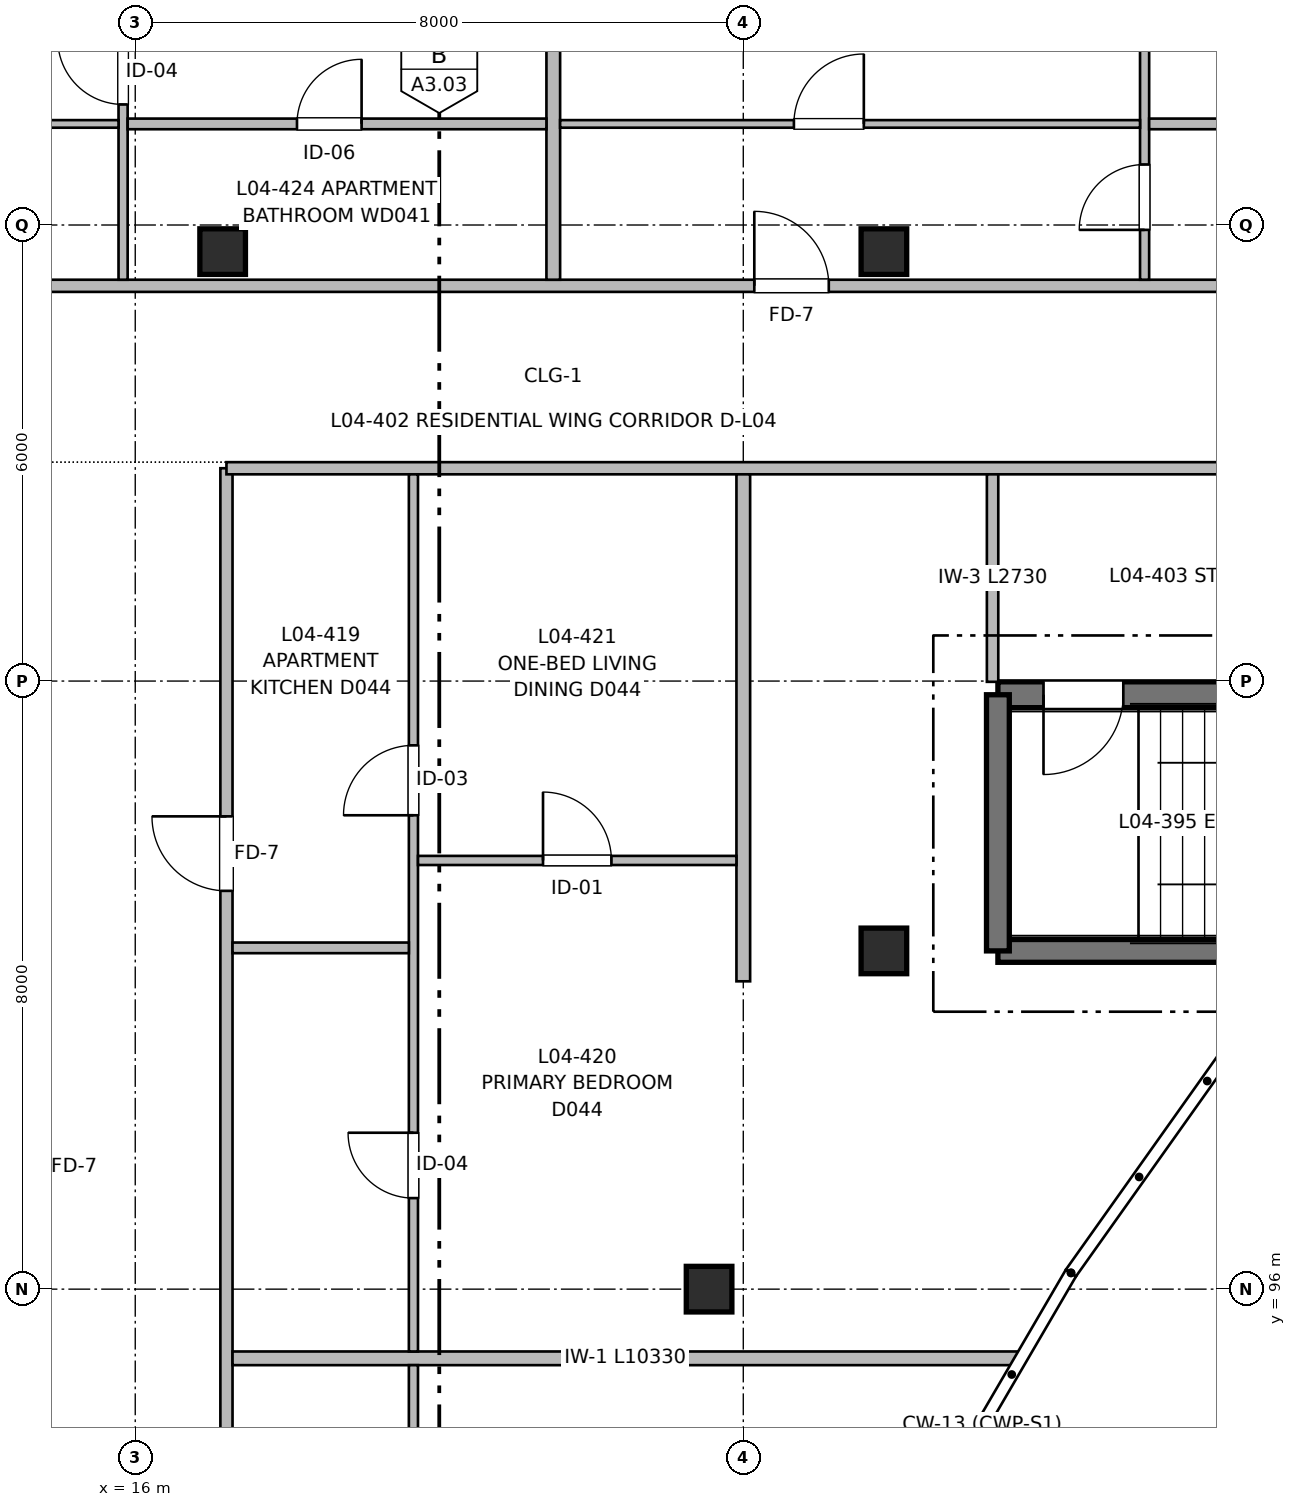
"""IFC4 building model, lengths in metres.
Left out: names, types, materials, properties, quantities, classifications, styles, units other than length and angle.
Written with IfcOpenShell. Run it as: python <this file> out.ifc"""

import sys

from ifc_helpers import new_model, si_unit, direction, frame, frame_2d, origin, origin_2d, place, context, subcontext, project, spatial, rectangle, extrude, element, fill, save


model = new_model("IFC4")
c1 = context("Model", 3, precision=1e-05, world=origin(), true_north=direction((0.0, 1.0)))
c2 = subcontext(c1, "Body", "Model", "MODEL_VIEW")
j1 = project(units=[si_unit("LENGTHUNIT", "METRE"), si_unit("PLANEANGLEUNIT", "RADIAN")], contexts=[c1])
p1 = place(None, origin())
s1 = spatial("IfcSite", under=j1, at=p1, CompositionType="ELEMENT")
p2 = place(p1, origin())
s2 = spatial("IfcBuilding", under=s1, at=p2, CompositionType="ELEMENT")
p3 = place(p2, frame((0.0, 0.0, 13.76)))
s3 = spatial("IfcBuildingStorey", under=s2, at=p3, CompositionType="ELEMENT", Elevation=13.76)
for number, where, z_axis, x_axis in (
    (1, (17.15, 109.65, 0.0), (0.0, 0.0, 1.0), (1.0, 0.0, 0.0)),
    (2, (23.55, 96.0, 0.0), (0.0, 0.0, 1.0), (1.0, 0.0, 0.0)),
    (3, (25.85, 100.45, 0.0), (0.0, 0.0, 1.0), (1.0, 0.0, 0.0)),
    (4, (25.85, 109.65, 0.0), (0.0, 0.0, 1.0), (1.0, 0.0, 0.0)),
):
    element("IfcColumn", number, at=place(p3, frame(where, z_axis=z_axis, x_axis=x_axis)), inside=s3, PredefinedType="COLUMN", context=c2, shape_type="SweptSolid", body=[
        extrude(rectangle(XDim=0.6, YDim=0.6, at=origin_2d()), origin(), (0.0, 0.0, 1.0), 3.2),
    ])
p4 = place(p3, frame((27.35, 100.45, 0.0), z_axis=(0.0, 0.0, 1.0), x_axis=(1.0, 0.0, 0.0)))
e5 = element("IfcWall", 5, at=p4, inside=s3, PredefinedType="SHEAR", context=c2, shape_type="SweptSolid", body=[
    extrude(rectangle(XDim=6.9, YDim=0.3, at=frame_2d((3.45, 0.0))), origin(), (0.0, 0.0, 1.0), 3.2),
])
p5 = place(p3, frame((34.25, 103.82, 0.0), z_axis=(0.0, 0.0, 1.0), x_axis=(-1.0, 0.0, 0.0)))
e6 = element("IfcWall", 6, at=p5, inside=s3, PredefinedType="SHEAR", context=c2, shape_type="SweptSolid", body=[
    extrude(rectangle(XDim=6.9, YDim=0.34, at=frame_2d((3.45, 0.0))), origin(), (0.0, 0.0, 1.0), 3.2),
])
p6 = place(p5, frame((5.25, 0.0, 0.0)))
e7 = element("IfcOpeningElement", 7, at=p6, cuts=e6, PredefinedType="OPENING", context=c2, shape_type="SweptSolid", body=[
    extrude(rectangle(XDim=1.05, YDim=2.15, at=frame_2d((0.525, 1.075))), frame((0.0, 0.18, 0.0), z_axis=(0.0, -1.0, 0.0), x_axis=(1.0, 0.0, 0.0)), (0.0, 0.0, 1.0), 0.36),
])
p7 = place(p3, frame((27.35, 103.82, 0.0), z_axis=(0.0, 0.0, 1.0), x_axis=(0.0, -1.0, 0.0)))
e8 = element("IfcWall", 8, at=p7, inside=s3, PredefinedType="SHEAR", context=c2, shape_type="SweptSolid", body=[
    extrude(rectangle(XDim=3.37, YDim=0.3, at=frame_2d((1.685, 0.0))), origin(), (0.0, 0.0, 1.0), 3.2),
])
p8 = place(p3, frame((17.2, 56.16, 0.0), z_axis=(0.0, 0.0, 1.0), x_axis=(0.0, 1.0, 0.0)))
e9 = element("IfcWall", 9, at=p8, inside=s3, PredefinedType="PARTITIONING", context=c2, shape_type="SweptSolid", body=[
    extrude(rectangle(XDim=50.64, YDim=0.16, at=frame_2d((25.32, 0.0))), origin(), (0.0, 0.0, 1.0), 2.935),
])
p9 = place(p8, frame((6.99, 0.0, 0.0)))
e10 = element("IfcOpeningElement", 10, at=p9, cuts=e9, PredefinedType="OPENING", context=c2, shape_type="SweptSolid", body=[
    extrude(rectangle(XDim=0.98, YDim=2.15, at=frame_2d((0.49, 1.075))), frame((0.0, 0.09, 0.0), z_axis=(0.0, -1.0, 0.0), x_axis=(1.0, 0.0, 0.0)), (0.0, 0.0, 1.0), 0.18),
])
p10 = place(p8, frame((20.92, 0.0, 0.0)))
e11 = element("IfcOpeningElement", 11, at=p10, cuts=e9, PredefinedType="OPENING", context=c2, shape_type="SweptSolid", body=[
    extrude(rectangle(XDim=0.98, YDim=2.15, at=frame_2d((0.49, 1.075))), frame((0.0, 0.09, 0.0), z_axis=(0.0, -1.0, 0.0), x_axis=(1.0, 0.0, 0.0)), (0.0, 0.0, 1.0), 0.18),
])
p11 = place(p8, frame((33.68, 0.0, 0.0)))
e12 = element("IfcOpeningElement", 12, at=p11, cuts=e9, PredefinedType="OPENING", context=c2, shape_type="SweptSolid", body=[
    extrude(rectangle(XDim=0.98, YDim=2.15, at=frame_2d((0.49, 1.075))), frame((0.0, 0.09, 0.0), z_axis=(0.0, -1.0, 0.0), x_axis=(1.0, 0.0, 0.0)), (0.0, 0.0, 1.0), 0.18),
])
p12 = place(p8, frame((45.08, 0.0, 0.0)))
e13 = element("IfcOpeningElement", 13, at=p12, cuts=e9, PredefinedType="OPENING", context=c2, shape_type="SweptSolid", body=[
    extrude(rectangle(XDim=0.98, YDim=2.15, at=frame_2d((0.49, 1.075))), frame((0.0, 0.09, 0.0), z_axis=(0.0, -1.0, 0.0), x_axis=(1.0, 0.0, 0.0)), (0.0, 0.0, 1.0), 0.18),
])
p13 = place(p3, frame((17.2, 106.8, 0.0), z_axis=(0.0, 0.0, 1.0), x_axis=(1.0, 0.0, 0.0)))
e14 = element("IfcWall", 14, at=p13, inside=s3, PredefinedType="PARTITIONING", context=c2, shape_type="SweptSolid", body=[
    extrude(rectangle(XDim=17.64, YDim=0.16, at=frame_2d((8.82, 0.0))), origin(), (0.0, 0.0, 1.0), 2.935),
])
p14 = place(p13, frame((13.075, 0.0, 0.0)))
e15 = element("IfcOpeningElement", 15, at=p14, cuts=e14, PredefinedType="OPENING", context=c2, shape_type="SweptSolid", body=[
    extrude(rectangle(XDim=1.05, YDim=2.15, at=frame_2d((0.525, 1.075))), frame((0.0, 0.09, 0.0), z_axis=(0.0, -1.0, 0.0), x_axis=(1.0, 0.0, 0.0)), (0.0, 0.0, 1.0), 0.18),
])
p15 = place(p3, frame((8.16, 109.2, 0.0), z_axis=(0.0, 0.0, 1.0), x_axis=(1.0, 0.0, 0.0)))
e16 = element("IfcWall", 16, at=p15, inside=s3, PredefinedType="PARTITIONING", context=c2, shape_type="SweptSolid", body=[
    extrude(rectangle(XDim=26.68, YDim=0.16, at=frame_2d((13.34, 0.0))), origin(), (0.0, 0.0, 1.0), 2.935),
])
p16 = place(p15, frame((3.35, 0.0, 0.0)))
e17 = element("IfcOpeningElement", 17, at=p16, cuts=e16, PredefinedType="OPENING", context=c2, shape_type="SweptSolid", body=[
    extrude(rectangle(XDim=0.98, YDim=2.15, at=frame_2d((0.49, 1.075))), frame((0.0, 0.09, 0.0), z_axis=(0.0, -1.0, 0.0), x_axis=(1.0, 0.0, 0.0)), (0.0, 0.0, 1.0), 0.18),
])
p17 = place(p15, frame((15.985, 0.0, 0.0)))
e18 = element("IfcOpeningElement", 18, at=p17, cuts=e16, PredefinedType="OPENING", context=c2, shape_type="SweptSolid", body=[
    extrude(rectangle(XDim=0.98, YDim=2.15, at=frame_2d((0.49, 1.075))), frame((0.0, 0.09, 0.0), z_axis=(0.0, -1.0, 0.0), x_axis=(1.0, 0.0, 0.0)), (0.0, 0.0, 1.0), 0.18),
])
p18 = place(p3, frame((24.0, 100.05, 0.0), z_axis=(0.0, 0.0, 1.0), x_axis=(0.0, 1.0, 0.0)))
e19 = element("IfcWall", 19, at=p18, inside=s3, PredefinedType="PARTITIONING", context=c2, shape_type="SweptSolid", body=[
    extrude(rectangle(XDim=6.67, YDim=0.18, at=frame_2d((3.335, 0.0))), origin(), (0.0, 0.0, 1.0), 2.935),
])
p19 = place(p3, frame((27.28, 103.99, 0.0), z_axis=(0.0, 0.0, 1.0), x_axis=(0.0, 1.0, 0.0)))
e20 = element("IfcWall", 20, at=p19, inside=s3, PredefinedType="PARTITIONING", context=c2, shape_type="SweptSolid", body=[
    extrude(rectangle(XDim=2.73, YDim=0.15, at=frame_2d((1.365, 0.0))), origin(), (0.0, 0.0, 1.0), 2.935),
])
p20 = place(p3, frame((17.28, 95.09, 0.0), z_axis=(0.0, 0.0, 1.0), x_axis=(1.0, 0.0, 0.0)))
e21 = element("IfcWall", 21, at=p20, inside=s3, PredefinedType="PARTITIONING", context=c2, shape_type="SweptSolid", body=[
    extrude(rectangle(XDim=10.33, YDim=0.18, at=frame_2d((5.165, 0.0))), origin(), (0.0, 0.0, 1.0), 2.935),
])
p21 = place(p3, frame((19.66, 84.06, 0.0), z_axis=(0.0, 0.0, 1.0), x_axis=(0.0, 1.0, 0.0)))
e22 = element("IfcWall", 22, at=p21, inside=s3, PredefinedType="PARTITIONING", context=c2, shape_type="SweptSolid", body=[
    extrude(rectangle(XDim=10.94, YDim=0.12, at=frame_2d((5.47, 0.0))), origin(), (0.0, 0.0, 1.0), 2.935),
])
p22 = place(p21, frame((1.911, 0.0, 0.0)))
e23 = element("IfcOpeningElement", 23, at=p22, cuts=e22, PredefinedType="OPENING", context=c2, shape_type="SweptSolid", body=[
    extrude(rectangle(XDim=0.86, YDim=2.1, at=frame_2d((0.43, 1.05))), frame((0.0, 0.07, 0.0), z_axis=(0.0, -1.0, 0.0), x_axis=(1.0, 0.0, 0.0)), (0.0, 0.0, 1.0), 0.14),
])
p23 = place(p21, frame((6.685, 0.0, 0.0)))
e24 = element("IfcOpeningElement", 24, at=p23, cuts=e22, PredefinedType="OPENING", context=c2, shape_type="SweptSolid", body=[
    extrude(rectangle(XDim=0.92, YDim=2.1, at=frame_2d((0.46, 1.05))), frame((0.0, 0.07, 0.0), z_axis=(0.0, -1.0, 0.0), x_axis=(1.0, 0.0, 0.0)), (0.0, 0.0, 1.0), 0.14),
])
p24 = place(p3, frame((19.66, 95.18, 0.0), z_axis=(0.0, 0.0, 1.0), x_axis=(0.0, 1.0, 0.0)))
e25 = element("IfcWall", 25, at=p24, inside=s3, PredefinedType="PARTITIONING", context=c2, shape_type="SweptSolid", body=[
    extrude(rectangle(XDim=11.54, YDim=0.12, at=frame_2d((5.77, 0.0))), origin(), (0.0, 0.0, 1.0), 2.935),
])
p25 = place(p24, frame((2.018, 0.0, 0.0)))
e26 = element("IfcOpeningElement", 26, at=p25, cuts=e25, PredefinedType="OPENING", context=c2, shape_type="SweptSolid", body=[
    extrude(rectangle(XDim=0.86, YDim=2.1, at=frame_2d((0.43, 1.05))), frame((0.0, 0.07, 0.0), z_axis=(0.0, -1.0, 0.0), x_axis=(1.0, 0.0, 0.0)), (0.0, 0.0, 1.0), 0.14),
])
p26 = place(p24, frame((7.054, 0.0, 0.0)))
e27 = element("IfcOpeningElement", 27, at=p26, cuts=e25, PredefinedType="OPENING", context=c2, shape_type="SweptSolid", body=[
    extrude(rectangle(XDim=0.92, YDim=2.1, at=frame_2d((0.46, 1.05))), frame((0.0, 0.07, 0.0), z_axis=(0.0, -1.0, 0.0), x_axis=(1.0, 0.0, 0.0)), (0.0, 0.0, 1.0), 0.14),
])
p27 = place(p3, frame((17.28, 100.49, 0.0), z_axis=(0.0, 0.0, 1.0), x_axis=(1.0, 0.0, 0.0)))
e28 = element("IfcWall", 28, at=p27, inside=s3, PredefinedType="PARTITIONING", context=c2, shape_type="SweptSolid", body=[
    extrude(rectangle(XDim=2.32, YDim=0.14, at=frame_2d((1.16, 0.0))), origin(), (0.0, 0.0, 1.0), 2.73),
])
p28 = place(p3, frame((19.72, 101.64, 0.0), z_axis=(0.0, 0.0, 1.0), x_axis=(1.0, 0.0, 0.0)))
e29 = element("IfcWall", 29, at=p28, inside=s3, PredefinedType="PARTITIONING", context=c2, shape_type="SweptSolid", body=[
    extrude(rectangle(XDim=4.19, YDim=0.12, at=frame_2d((2.095, 0.0))), origin(), (0.0, 0.0, 1.0), 2.935),
])
p29 = place(p28, frame((1.645, 0.0, 0.0)))
e30 = element("IfcOpeningElement", 30, at=p29, cuts=e29, PredefinedType="OPENING", context=c2, shape_type="SweptSolid", body=[
    extrude(rectangle(XDim=0.9, YDim=2.1, at=frame_2d((0.45, 1.05))), frame((0.0, 0.07, 0.0), z_axis=(0.0, -1.0, 0.0), x_axis=(1.0, 0.0, 0.0)), (0.0, 0.0, 1.0), 0.14),
])
p30 = place(p3, frame((21.5, 109.28, 0.0), z_axis=(0.0, 0.0, 1.0), x_axis=(0.0, 1.0, 0.0)))
e31 = element("IfcWall", 31, at=p30, inside=s3, PredefinedType="PARTITIONING", context=c2, shape_type="SweptSolid", body=[
    extrude(rectangle(XDim=6.59, YDim=0.18, at=frame_2d((3.295, 0.0))), origin(), (0.0, 0.0, 1.0), 2.935),
])
p31 = place(p3, frame((15.84, 109.28, 0.0), z_axis=(0.0, 0.0, 1.0), x_axis=(0.0, 1.0, 0.0)))
e32 = element("IfcWall", 32, at=p31, inside=s3, PredefinedType="PARTITIONING", context=c2, shape_type="SweptSolid", body=[
    extrude(rectangle(XDim=6.59, YDim=0.12, at=frame_2d((3.295, 0.0))), origin(), (0.0, 0.0, 1.0), 2.935),
])
p32 = place(p31, frame((2.306, 0.0, 0.0)))
e33 = element("IfcOpeningElement", 33, at=p32, cuts=e32, PredefinedType="OPENING", context=c2, shape_type="SweptSolid", body=[
    extrude(rectangle(XDim=0.86, YDim=2.1, at=frame_2d((0.43, 1.05))), frame((0.0, 0.07, 0.0), z_axis=(0.0, -1.0, 0.0), x_axis=(1.0, 0.0, 0.0)), (0.0, 0.0, 1.0), 0.14),
])
p33 = place(p31, frame((4.093, 0.0, 0.0)))
e34 = element("IfcOpeningElement", 34, at=p33, cuts=e32, PredefinedType="OPENING", context=c2, shape_type="SweptSolid", body=[
    extrude(rectangle(XDim=0.9, YDim=2.1, at=frame_2d((0.45, 1.05))), frame((0.0, 0.07, 0.0), z_axis=(0.0, -1.0, 0.0), x_axis=(1.0, 0.0, 0.0)), (0.0, 0.0, 1.0), 0.14),
])
p34 = place(p3, frame((15.9, 111.33, 0.0), z_axis=(0.0, 0.0, 1.0), x_axis=(1.0, 0.0, 0.0)))
e35 = element("IfcWall", 35, at=p34, inside=s3, PredefinedType="PARTITIONING", context=c2, shape_type="SweptSolid", body=[
    extrude(rectangle(XDim=5.51, YDim=0.14, at=frame_2d((2.755, 0.0))), origin(), (0.0, 0.0, 1.0), 2.935),
])
p35 = place(p34, frame((2.228, 0.0, 0.0)))
e36 = element("IfcOpeningElement", 36, at=p35, cuts=e35, PredefinedType="OPENING", context=c2, shape_type="SweptSolid", body=[
    extrude(rectangle(XDim=0.85, YDim=2.05, at=frame_2d((0.425, 1.025))), frame((0.0, 0.08, 0.0), z_axis=(0.0, -1.0, 0.0), x_axis=(1.0, 0.0, 0.0)), (0.0, 0.0, 1.0), 0.16),
])
p36 = place(p3, frame((8.16, 111.33, 0.0), z_axis=(0.0, 0.0, 1.0), x_axis=(1.0, 0.0, 0.0)))
e37 = element("IfcWall", 37, at=p36, inside=s3, PredefinedType="PARTITIONING", context=c2, shape_type="SweptSolid", body=[
    extrude(rectangle(XDim=7.62, YDim=0.1, at=frame_2d((3.81, 0.0))), origin(), (0.0, 0.0, 1.0), 2.935),
])
p37 = place(p36, frame((3.072, 0.0, 0.0)))
e38 = element("IfcOpeningElement", 38, at=p37, cuts=e37, PredefinedType="OPENING", context=c2, shape_type="SweptSolid", body=[
    extrude(rectangle(XDim=0.92, YDim=2.1, at=frame_2d((0.46, 1.05))), frame((0.0, 0.06, 0.0), z_axis=(0.0, -1.0, 0.0), x_axis=(1.0, 0.0, 0.0)), (0.0, 0.0, 1.0), 0.12),
])
p38 = place(p3, frame((29.28, 109.28, 0.0), z_axis=(0.0, 0.0, 1.0), x_axis=(0.0, 1.0, 0.0)))
e39 = element("IfcWall", 39, at=p38, inside=s3, PredefinedType="PARTITIONING", context=c2, shape_type="SweptSolid", body=[
    extrude(rectangle(XDim=6.59, YDim=0.12, at=frame_2d((3.295, 0.0))), origin(), (0.0, 0.0, 1.0), 2.935),
])
p39 = place(p38, frame((0.656, 0.0, 0.0)))
e40 = element("IfcOpeningElement", 40, at=p39, cuts=e39, PredefinedType="OPENING", context=c2, shape_type="SweptSolid", body=[
    extrude(rectangle(XDim=0.86, YDim=2.1, at=frame_2d((0.43, 1.05))), frame((0.0, 0.07, 0.0), z_axis=(0.0, -1.0, 0.0), x_axis=(1.0, 0.0, 0.0)), (0.0, 0.0, 1.0), 0.14),
])
p40 = place(p38, frame((4.093, 0.0, 0.0)))
e41 = element("IfcOpeningElement", 41, at=p40, cuts=e39, PredefinedType="OPENING", context=c2, shape_type="SweptSolid", body=[
    extrude(rectangle(XDim=0.9, YDim=2.1, at=frame_2d((0.45, 1.05))), frame((0.0, 0.07, 0.0), z_axis=(0.0, -1.0, 0.0), x_axis=(1.0, 0.0, 0.0)), (0.0, 0.0, 1.0), 0.14),
])
p41 = place(p3, frame((29.34, 111.33, 0.0), z_axis=(0.0, 0.0, 1.0), x_axis=(1.0, 0.0, 0.0)))
e42 = element("IfcWall", 42, at=p41, inside=s3, PredefinedType="PARTITIONING", context=c2, shape_type="SweptSolid", body=[
    extrude(rectangle(XDim=5.5, YDim=0.14, at=frame_2d((2.75, 0.0))), origin(), (0.0, 0.0, 1.0), 2.935),
])
p42 = place(p41, frame((2.224, 0.0, 0.0)))
e43 = element("IfcOpeningElement", 43, at=p42, cuts=e42, PredefinedType="OPENING", context=c2, shape_type="SweptSolid", body=[
    extrude(rectangle(XDim=0.85, YDim=2.05, at=frame_2d((0.425, 1.025))), frame((0.0, 0.08, 0.0), z_axis=(0.0, -1.0, 0.0), x_axis=(1.0, 0.0, 0.0)), (0.0, 0.0, 1.0), 0.16),
])
p43 = place(p3, frame((21.59, 111.33, 0.0), z_axis=(0.0, 0.0, 1.0), x_axis=(1.0, 0.0, 0.0)))
e44 = element("IfcWall", 44, at=p43, inside=s3, PredefinedType="PARTITIONING", context=c2, shape_type="SweptSolid", body=[
    extrude(rectangle(XDim=7.63, YDim=0.1, at=frame_2d((3.815, 0.0))), origin(), (0.0, 0.0, 1.0), 2.935),
])
p44 = place(p43, frame((3.076, 0.0, 0.0)))
e45 = element("IfcOpeningElement", 45, at=p44, cuts=e44, PredefinedType="OPENING", context=c2, shape_type="SweptSolid", body=[
    extrude(rectangle(XDim=0.92, YDim=2.1, at=frame_2d((0.46, 1.05))), frame((0.0, 0.06, 0.0), z_axis=(0.0, -1.0, 0.0), x_axis=(1.0, 0.0, 0.0)), (0.0, 0.0, 1.0), 0.12),
])
p45 = place(p6, origin())
e46 = element("IfcDoor", 46, at=p45, inside=s3, OperationType="SINGLE_SWING_RIGHT", PredefinedType="DOOR", context=c2, shape_type="SweptSolid", body=[
    extrude(rectangle(XDim=1.05, YDim=2.15, at=frame_2d((0.525, 1.075))), frame((0.0, 0.025, 0.0), z_axis=(0.0, -1.0, 0.0), x_axis=(1.0, 0.0, 0.0)), (0.0, 0.0, 1.0), 0.05),
])
fill(e7, e46)
p46 = place(p25, origin())
e47 = element("IfcDoor", 47, at=p46, inside=s3, OperationType="SINGLE_SWING_RIGHT", PredefinedType="DOOR", context=c2, shape_type="SweptSolid", body=[
    extrude(rectangle(XDim=0.86, YDim=2.1, at=frame_2d((0.43, 1.05))), frame((0.0, 0.025, 0.0), z_axis=(0.0, -1.0, 0.0), x_axis=(1.0, 0.0, 0.0)), (0.0, 0.0, 1.0), 0.05),
])
fill(e26, e47)
p47 = place(p26, origin())
e48 = element("IfcDoor", 48, at=p47, inside=s3, OperationType="SINGLE_SWING_LEFT", PredefinedType="DOOR", context=c2, shape_type="SweptSolid", body=[
    extrude(rectangle(XDim=0.92, YDim=2.1, at=frame_2d((0.46, 1.05))), frame((0.0, 0.025, 0.0), z_axis=(0.0, -1.0, 0.0), x_axis=(1.0, 0.0, 0.0)), (0.0, 0.0, 1.0), 0.05),
])
fill(e27, e48)
p48 = place(p12, origin())
e49 = element("IfcDoor", 49, at=p48, inside=s3, OperationType="SINGLE_SWING_RIGHT", PredefinedType="DOOR", context=c2, shape_type="SweptSolid", body=[
    extrude(rectangle(XDim=0.98, YDim=2.15, at=frame_2d((0.49, 1.075))), frame((0.0, 0.025, 0.0), z_axis=(0.0, -1.0, 0.0), x_axis=(1.0, 0.0, 0.0)), (0.0, 0.0, 1.0), 0.05),
])
fill(e13, e49)
p49 = place(p29, origin())
e50 = element("IfcDoor", 50, at=p49, inside=s3, OperationType="SINGLE_SWING_LEFT", PredefinedType="DOOR", context=c2, shape_type="SweptSolid", body=[
    extrude(rectangle(XDim=0.9, YDim=2.1, at=frame_2d((0.45, 1.05))), frame((0.0, 0.025, 0.0), z_axis=(0.0, -1.0, 0.0), x_axis=(1.0, 0.0, 0.0)), (0.0, 0.0, 1.0), 0.05),
])
fill(e30, e50)
p50 = place(p32, origin())
e51 = element("IfcDoor", 51, at=p50, inside=s3, OperationType="SINGLE_SWING_RIGHT", PredefinedType="DOOR", context=c2, shape_type="SweptSolid", body=[
    extrude(rectangle(XDim=0.86, YDim=2.1, at=frame_2d((0.43, 1.05))), frame((0.0, 0.025, 0.0), z_axis=(0.0, -1.0, 0.0), x_axis=(1.0, 0.0, 0.0)), (0.0, 0.0, 1.0), 0.05),
])
fill(e33, e51)
p51 = place(p35, origin())
e52 = element("IfcDoor", 52, at=p51, inside=s3, OperationType="SINGLE_SWING_RIGHT", PredefinedType="DOOR", context=c2, shape_type="SweptSolid", body=[
    extrude(rectangle(XDim=0.85, YDim=2.05, at=frame_2d((0.425, 1.025))), frame((0.0, 0.025, 0.0), z_axis=(0.0, -1.0, 0.0), x_axis=(1.0, 0.0, 0.0)), (0.0, 0.0, 1.0), 0.05),
])
fill(e36, e52)
p52 = place(p17, origin())
e53 = element("IfcDoor", 53, at=p52, inside=s3, OperationType="SINGLE_SWING_LEFT", PredefinedType="DOOR", context=c2, shape_type="SweptSolid", body=[
    extrude(rectangle(XDim=0.98, YDim=2.15, at=frame_2d((0.49, 1.075))), frame((0.0, 0.025, 0.0), z_axis=(0.0, -1.0, 0.0), x_axis=(1.0, 0.0, 0.0)), (0.0, 0.0, 1.0), 0.05),
])
fill(e18, e53)
p53 = place(p44, origin())
e54 = element("IfcDoor", 54, at=p53, inside=s3, OperationType="SINGLE_SWING_RIGHT", PredefinedType="DOOR", context=c2, shape_type="SweptSolid", body=[
    extrude(rectangle(XDim=0.92, YDim=2.1, at=frame_2d((0.46, 1.05))), frame((0.0, 0.025, 0.0), z_axis=(0.0, -1.0, 0.0), x_axis=(1.0, 0.0, 0.0)), (0.0, 0.0, 1.0), 0.05),
])
fill(e45, e54)
p54 = place(p39, origin())
e55 = element("IfcDoor", 55, at=p54, inside=s3, OperationType="SINGLE_SWING_LEFT", PredefinedType="DOOR", context=c2, shape_type="SweptSolid", body=[
    extrude(rectangle(XDim=0.86, YDim=2.1, at=frame_2d((0.43, 1.05))), frame((0.0, 0.025, 0.0), z_axis=(0.0, -1.0, 0.0), x_axis=(1.0, 0.0, 0.0)), (0.0, 0.0, 1.0), 0.05),
])
fill(e40, e55)
save(model, sys.argv[1])
